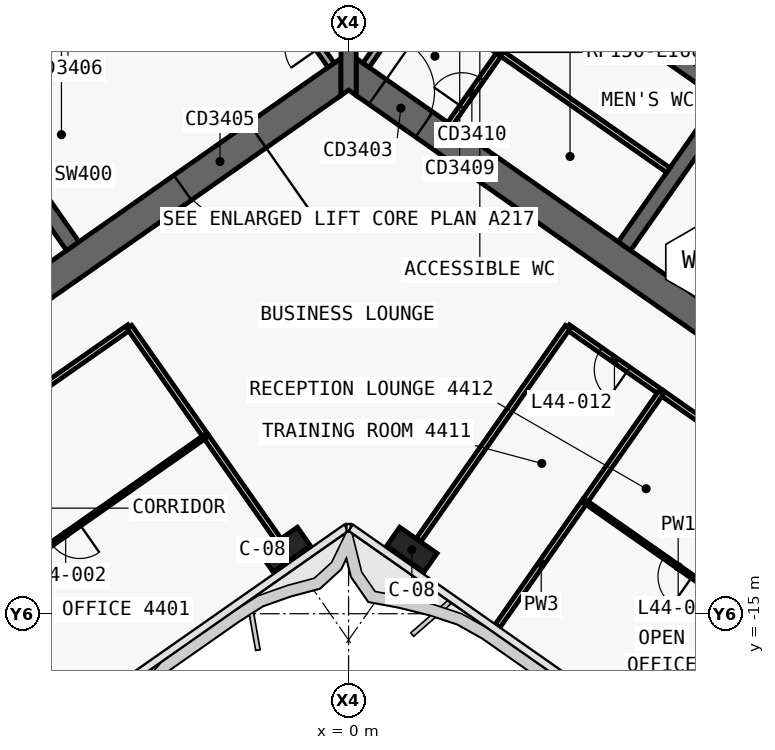
"""IFC4 building model, lengths in metres.
Left out: names, types, materials, properties, quantities, classifications, styles, units other than length and angle.
Written with IfcOpenShell. Run it as: python <this file> out.ifc"""

import sys

from ifc_helpers import new_model, si_unit, direction, frame, frame_2d, origin, origin_2d, place, context, subcontext, project, spatial, polyline, rectangle, outline, extrude, element, fill, save


model = new_model("IFC4")
c1 = context("Model", 3, precision=1e-05, world=origin(), true_north=direction((0.0, 1.0)))
c2 = subcontext(c1, "Body", "Model", "MODEL_VIEW")
j1 = project(units=[si_unit("LENGTHUNIT", "METRE"), si_unit("PLANEANGLEUNIT", "RADIAN")], contexts=[c1])
p1 = place(None, origin())
s1 = spatial("IfcSite", under=j1, at=p1, CompositionType="ELEMENT")
p2 = place(p1, origin())
s2 = spatial("IfcBuilding", under=s1, at=p2, CompositionType="ELEMENT")
p3 = place(p2, frame((0.0, 0.0, 190.5)))
s3 = spatial("IfcBuildingStorey", under=s2, at=p3, CompositionType="ELEMENT", Elevation=190.5)
p4 = place(p3, frame((0.029, 11.984, 0.0), z_axis=(0.0, 0.0, 1.0), x_axis=(-0.819151382952, -0.573577380837, 0.0)))
e1 = element("IfcWall", 1, at=p4, inside=s3, PredefinedType="SHEAR", context=c2, shape_type="SweptSolid", body=[
    extrude(outline(polyline([(33.898, 0.4), (0.56, 0.4), (-0.0, -0.4), (33.898, -0.4), (33.898, 0.4)])), origin(), (0.0, 0.0, 1.0), 3.9),
])
p5 = place(p3, frame((0.029, -0.712, 0.0), z_axis=(0.0, 0.0, 1.0), x_axis=(-0.819151758019, -0.573576845187, 0.0)))
e2 = element("IfcWall", 2, at=p5, inside=s3, PredefinedType="SHEAR", context=c2, shape_type="SweptSolid", body=[
    extrude(outline(polyline([(26.616, 0.4), (0.56, 0.4), (-0.0, -0.4), (26.616, -0.4), (26.616, 0.4)])), origin(), (0.0, 0.0, 1.0), 3.9),
])
p6 = place(p5, frame((2.966, 0.0, 0.0)))
e3 = element("IfcOpeningElement", 3, at=p6, cuts=e2, PredefinedType="OPENING", context=c2, shape_type="SweptSolid", body=[
    extrude(rectangle(XDim=2.4, YDim=2.1, at=frame_2d((1.2, 1.05))), frame((0.0, 0.41, 0.0), z_axis=(0.0, -1.0, 0.0), x_axis=(1.0, 0.0, 0.0)), (0.0, 0.0, 1.0), 0.82),
])
p7 = place(p5, frame((11.916, 0.0, 0.0)))
e4 = element("IfcOpeningElement", 4, at=p7, cuts=e2, PredefinedType="OPENING", context=c2, shape_type="SweptSolid", body=[
    extrude(rectangle(XDim=2.4, YDim=2.1, at=frame_2d((1.2, 1.05))), frame((0.0, 0.41, 0.0), z_axis=(0.0, -1.0, 0.0), x_axis=(1.0, 0.0, 0.0)), (0.0, 0.0, 1.0), 0.82),
])
p8 = place(p3, frame((-7.258, -5.326, 0.0), z_axis=(0.0, 0.0, 1.0), x_axis=(-0.573540709186, 0.819177059558, 0.0)))
e5 = element("IfcWall", 5, at=p8, inside=s3, PredefinedType="SHEAR", context=c2, shape_type="SweptSolid", body=[
    extrude(outline(polyline([(4.6, 0.2), (-0.0, 0.2), (-0.0, -0.2), (4.6, -0.2), (4.6, 0.2)])), origin(), (0.0, 0.0, 1.0), 3.9),
])
p9 = place(p3, frame((-2.638, 3.768, 0.0), z_axis=(0.0, 0.0, 1.0), x_axis=(-0.81915267502, -0.573575535572, 0.0)))
e6 = element("IfcWall", 6, at=p9, inside=s3, PredefinedType="SHEAR", context=c2, shape_type="SweptSolid", body=[
    extrude(outline(polyline([(26.2, 0.2), (0.0, 0.2), (0.0, -0.2), (26.2, -0.2), (26.2, 0.2)])), origin(), (0.0, 0.0, 1.0), 3.9),
])
p10 = place(p9, frame((1.169, 0.0, 0.0)))
e7 = element("IfcOpeningElement", 7, at=p10, cuts=e6, PredefinedType="OPENING", context=c2, shape_type="SweptSolid", body=[
    extrude(rectangle(XDim=1.1, YDim=2.1, at=frame_2d((0.55, 1.05))), frame((0.0, 0.21, 0.0), z_axis=(0.0, -1.0, 0.0), x_axis=(1.0, 0.0, 0.0)), (0.0, 0.0, 1.0), 0.42),
])
p11 = place(p9, frame((3.206, 0.0, 0.0)))
e8 = element("IfcOpeningElement", 8, at=p11, cuts=e6, PredefinedType="OPENING", context=c2, shape_type="SweptSolid", body=[
    extrude(rectangle(XDim=1.1, YDim=2.1, at=frame_2d((0.55, 1.05))), frame((0.0, 0.21, 0.0), z_axis=(0.0, -1.0, 0.0), x_axis=(1.0, 0.0, 0.0)), (0.0, 0.0, 1.0), 0.42),
])
p12 = place(p9, frame((5.244, 0.0, 0.0)))
e9 = element("IfcOpeningElement", 9, at=p12, cuts=e6, PredefinedType="OPENING", context=c2, shape_type="SweptSolid", body=[
    extrude(rectangle(XDim=1.1, YDim=2.1, at=frame_2d((0.55, 1.05))), frame((0.0, 0.21, 0.0), z_axis=(0.0, -1.0, 0.0), x_axis=(1.0, 0.0, 0.0)), (0.0, 0.0, 1.0), 0.42),
])
p13 = place(p9, frame((7.281, 0.0, 0.0)))
e10 = element("IfcOpeningElement", 10, at=p13, cuts=e6, PredefinedType="OPENING", context=c2, shape_type="SweptSolid", body=[
    extrude(rectangle(XDim=1.1, YDim=2.1, at=frame_2d((0.55, 1.05))), frame((0.0, 0.21, 0.0), z_axis=(0.0, -1.0, 0.0), x_axis=(1.0, 0.0, 0.0)), (0.0, 0.0, 1.0), 0.42),
])
p14 = place(p9, frame((9.688, 0.0, 0.0)))
e11 = element("IfcOpeningElement", 11, at=p14, cuts=e6, PredefinedType="OPENING", context=c2, shape_type="SweptSolid", body=[
    extrude(rectangle(XDim=1.1, YDim=2.1, at=frame_2d((0.55, 1.05))), frame((0.0, 0.21, 0.0), z_axis=(0.0, -1.0, 0.0), x_axis=(1.0, 0.0, 0.0)), (0.0, 0.0, 1.0), 0.42),
])
p15 = place(p9, frame((11.863, 0.0, 0.0)))
e12 = element("IfcOpeningElement", 12, at=p15, cuts=e6, PredefinedType="OPENING", context=c2, shape_type="SweptSolid", body=[
    extrude(rectangle(XDim=1.1, YDim=2.1, at=frame_2d((0.55, 1.05))), frame((0.0, 0.21, 0.0), z_axis=(0.0, -1.0, 0.0), x_axis=(1.0, 0.0, 0.0)), (0.0, 0.0, 1.0), 0.42),
])
p16 = place(p9, frame((15.175, 0.0, 0.0)))
e13 = element("IfcOpeningElement", 13, at=p16, cuts=e6, PredefinedType="OPENING", context=c2, shape_type="SweptSolid", body=[
    extrude(rectangle(XDim=1.0, YDim=2.1, at=frame_2d((0.5, 1.05))), frame((0.0, 0.21, 0.0), z_axis=(0.0, -1.0, 0.0), x_axis=(1.0, 0.0, 0.0)), (0.0, 0.0, 1.0), 0.42),
])
p17 = place(p3, frame((-0.029, 11.984, 0.0), z_axis=(0.0, 0.0, 1.0), x_axis=(0.819151382952, -0.573577380837, 0.0)))
e14 = element("IfcWall", 14, at=p17, inside=s3, PredefinedType="SHEAR", context=c2, shape_type="SweptSolid", body=[
    extrude(outline(polyline([(33.898, 0.4), (-0.0, 0.4), (0.56, -0.4), (33.898, -0.4), (33.898, 0.4)])), origin(), (0.0, 0.0, 1.0), 3.9),
])
p18 = place(p3, frame((-0.029, -0.712, 0.0), z_axis=(0.0, 0.0, 1.0), x_axis=(0.819151758019, -0.573576845187, 0.0)))
e15 = element("IfcWall", 15, at=p18, inside=s3, PredefinedType="SHEAR", context=c2, shape_type="SweptSolid", body=[
    extrude(outline(polyline([(26.616, 0.4), (-0.0, 0.4), (0.56, -0.4), (26.616, -0.4), (26.616, 0.4)])), origin(), (0.0, 0.0, 1.0), 3.9),
])
p19 = place(p18, frame((0.966, 0.0, 0.0)))
e16 = element("IfcOpeningElement", 16, at=p19, cuts=e15, PredefinedType="OPENING", context=c2, shape_type="SweptSolid", body=[
    extrude(rectangle(XDim=1.5, YDim=2.1, at=frame_2d((0.75, 1.05))), frame((0.0, 0.41, 0.0), z_axis=(0.0, -1.0, 0.0), x_axis=(1.0, 0.0, 0.0)), (0.0, 0.0, 1.0), 0.82),
])
p20 = place(p18, frame((12.366, 0.0, 0.0)))
e17 = element("IfcOpeningElement", 17, at=p20, cuts=e15, PredefinedType="OPENING", context=c2, shape_type="SweptSolid", body=[
    extrude(rectangle(XDim=1.5, YDim=2.1, at=frame_2d((0.75, 1.05))), frame((0.0, 0.41, 0.0), z_axis=(0.0, -1.0, 0.0), x_axis=(1.0, 0.0, 0.0)), (0.0, 0.0, 1.0), 0.82),
])
p21 = place(p3, frame((7.258, -5.326, 0.0), z_axis=(0.0, 0.0, 1.0), x_axis=(0.573540709186, 0.819177059558, 0.0)))
e18 = element("IfcWall", 18, at=p21, inside=s3, PredefinedType="SHEAR", context=c2, shape_type="SweptSolid", body=[
    extrude(outline(polyline([(-0.0, 0.2), (-0.0, -0.2), (4.6, -0.2), (4.6, 0.2), (-0.0, 0.2)])), origin(), (0.0, 0.0, 1.0), 3.9),
])
p22 = place(p3, frame((2.638, 3.768, 0.0), z_axis=(0.0, 0.0, 1.0), x_axis=(0.81915267502, -0.573575535572, 0.0)))
e19 = element("IfcWall", 19, at=p22, inside=s3, PredefinedType="SHEAR", context=c2, shape_type="SweptSolid", body=[
    extrude(outline(polyline([(0.0, 0.2), (0.0, -0.2), (26.2, -0.2), (26.2, 0.2), (0.0, 0.2)])), origin(), (0.0, 0.0, 1.0), 3.9),
])
p23 = place(p22, frame((9.637, 0.0, 0.0)))
e20 = element("IfcOpeningElement", 20, at=p23, cuts=e19, PredefinedType="OPENING", context=c2, shape_type="SweptSolid", body=[
    extrude(rectangle(XDim=1.2, YDim=2.1, at=frame_2d((0.6, 1.05))), frame((0.0, 0.21, 0.0), z_axis=(0.0, -1.0, 0.0), x_axis=(1.0, 0.0, 0.0)), (0.0, 0.0, 1.0), 0.42),
])
p24 = place(p22, frame((11.812, 0.0, 0.0)))
e21 = element("IfcOpeningElement", 21, at=p24, cuts=e19, PredefinedType="OPENING", context=c2, shape_type="SweptSolid", body=[
    extrude(rectangle(XDim=1.2, YDim=2.1, at=frame_2d((0.6, 1.05))), frame((0.0, 0.21, 0.0), z_axis=(0.0, -1.0, 0.0), x_axis=(1.0, 0.0, 0.0)), (0.0, 0.0, 1.0), 0.42),
])
p25 = place(p22, frame((13.988, 0.0, 0.0)))
e22 = element("IfcOpeningElement", 22, at=p25, cuts=e19, PredefinedType="OPENING", context=c2, shape_type="SweptSolid", body=[
    extrude(rectangle(XDim=1.2, YDim=2.1, at=frame_2d((0.6, 1.05))), frame((0.0, 0.21, 0.0), z_axis=(0.0, -1.0, 0.0), x_axis=(1.0, 0.0, 0.0)), (0.0, 0.0, 1.0), 0.42),
])
p26 = place(p22, frame((16.262, 0.0, 0.0)))
e23 = element("IfcOpeningElement", 23, at=p26, cuts=e19, PredefinedType="OPENING", context=c2, shape_type="SweptSolid", body=[
    extrude(rectangle(XDim=1.0, YDim=2.1, at=frame_2d((0.5, 1.05))), frame((0.0, 0.21, 0.0), z_axis=(0.0, -1.0, 0.0), x_axis=(1.0, 0.0, 0.0)), (0.0, 0.0, 1.0), 0.42),
])
p27 = place(p3, frame((0.0, -1.361, 0.0), z_axis=(0.0, 0.0, 1.0), x_axis=(0.0, 1.0, 0.0)))
e24 = element("IfcWall", 24, at=p27, inside=s3, PredefinedType="SHEAR", context=c2, shape_type="SweptSolid", body=[
    extrude(outline(polyline([(0.0, -0.2), (0.14, -0.2), (1.075, -0.2), (12.696, -0.2), (13.813, -0.2), (13.893, -0.2), (13.933, -0.172), (13.813, 0.0), (13.933, 0.172), (13.893, 0.2), (13.813, 0.2), (12.696, 0.2), (1.075, 0.2), (0.14, 0.2), (0.0, 0.2), (0.14, 0.0), (0.0, -0.2)])), origin(), (0.0, 0.0, 1.0), 3.9),
])
for number, where, z_axis, x_axis in (
    (25, (-1.665, -13.313, 0.0), (0.0, 0.0, 1.0), (-0.819, -0.574, 0.0)),
    (26, (1.665, -13.313, 0.0), (0.0, 0.0, 1.0), (0.819, -0.574, 0.0)),
):
    element("IfcColumn", number, at=place(p3, frame(where, z_axis=z_axis, x_axis=x_axis)), inside=s3, PredefinedType="COLUMN", context=c2, shape_type="SweptSolid", body=[
        extrude(rectangle(XDim=1.2, YDim=0.6, at=origin_2d()), origin(), (0.0, 0.0, 1.0), 3.9),
    ])
p28 = place(p3, frame((2.67, -2.114, 0.0), z_axis=(0.0, 0.0, 1.0), x_axis=(0.573576324356, 0.819152122709, 0.0)))
e27 = element("IfcWall", 27, at=p28, inside=s3, PredefinedType="PARTITIONING", context=c2, shape_type="SweptSolid", body=[
    extrude(rectangle(XDim=4.6, YDim=0.15, at=frame_2d((2.3, 0.0))), origin(), (0.0, 0.0, 1.0), 3.62),
])
p29 = place(p28, frame((0.55, 0.0, 0.0)))
e28 = element("IfcOpeningElement", 28, at=p29, cuts=e27, PredefinedType="OPENING", context=c2, shape_type="SweptSolid", body=[
    extrude(rectangle(XDim=0.9, YDim=2.1, at=frame_2d((0.45, 1.05))), frame((0.0, 0.085, 0.0), z_axis=(0.0, -1.0, 0.0), x_axis=(1.0, 0.0, 0.0)), (0.0, 0.0, 1.0), 0.17),
])
p30 = place(p28, frame((2.95, 0.0, 0.0)))
e29 = element("IfcOpeningElement", 29, at=p30, cuts=e27, PredefinedType="OPENING", context=c2, shape_type="SweptSolid", body=[
    extrude(rectangle(XDim=0.9, YDim=2.1, at=frame_2d((0.45, 1.05))), frame((0.0, 0.085, 0.0), z_axis=(0.0, -1.0, 0.0), x_axis=(1.0, 0.0, 0.0)), (0.0, 0.0, 1.0), 0.17),
])
p31 = place(p3, frame((1.86, 1.261, 0.0), z_axis=(0.0, 0.0, 1.0), x_axis=(0.819103967032, -0.573645091666, 0.0)))
e30 = element("IfcWall", 30, at=p31, inside=s3, PredefinedType="PARTITIONING", context=c2, shape_type="SweptSolid", body=[
    extrude(rectangle(XDim=2.6, YDim=0.15, at=frame_2d((1.3, 0.0))), origin(), (0.0, 0.0, 1.0), 3.62),
])
p32 = place(p31, frame((0.85, 0.0, 0.0)))
e31 = element("IfcOpeningElement", 31, at=p32, cuts=e30, PredefinedType="OPENING", context=c2, shape_type="SweptSolid", body=[
    extrude(rectangle(XDim=0.9, YDim=2.1, at=frame_2d((0.45, 1.05))), frame((0.0, 0.085, 0.0), z_axis=(0.0, -1.0, 0.0), x_axis=(1.0, 0.0, 0.0)), (0.0, 0.0, 1.0), 0.17),
])
p33 = place(p3, frame((3.99, -0.23, 0.0), z_axis=(0.0, 0.0, 1.0), x_axis=(0.819153326956, -0.573574604508, 0.0)))
e32 = element("IfcWall", 32, at=p33, inside=s3, PredefinedType="PARTITIONING", context=c2, shape_type="SweptSolid", body=[
    extrude(rectangle(XDim=5.4, YDim=0.15, at=frame_2d((2.7, 0.0))), origin(), (0.0, 0.0, 1.0), 3.62),
])
p34 = place(p3, frame((-0.459, -0.565, 0.0), z_axis=(0.0, 0.0, 1.0), x_axis=(-0.573576324356, 0.819152122709, 0.0)))
e33 = element("IfcWall", 33, at=p34, inside=s3, PredefinedType="SOLIDWALL", context=c2, shape_type="SweptSolid", body=[
    extrude(rectangle(XDim=4.6, YDim=0.2, at=frame_2d((2.3, 0.0))), origin(), (0.0, 0.0, 1.0), 3.62),
])
p35 = place(p34, frame((0.55, 0.0, 0.0)))
e34 = element("IfcOpeningElement", 34, at=p35, cuts=e33, PredefinedType="OPENING", context=c2, shape_type="SweptSolid", body=[
    extrude(rectangle(XDim=0.9, YDim=2.1, at=frame_2d((0.45, 1.05))), frame((0.0, 0.11, 0.0), z_axis=(0.0, -1.0, 0.0), x_axis=(1.0, 0.0, 0.0)), (0.0, 0.0, 1.0), 0.22),
])
p36 = place(p3, frame((0.459, -0.565, 0.0), z_axis=(0.0, 0.0, 1.0), x_axis=(0.573576324356, 0.819152122709, 0.0)))
e35 = element("IfcWall", 35, at=p36, inside=s3, PredefinedType="SOLIDWALL", context=c2, shape_type="SweptSolid", body=[
    extrude(rectangle(XDim=4.6, YDim=0.2, at=frame_2d((2.3, 0.0))), origin(), (0.0, 0.0, 1.0), 3.62),
])
p37 = place(p36, frame((0.55, 0.0, 0.0)))
e36 = element("IfcOpeningElement", 36, at=p37, cuts=e35, PredefinedType="OPENING", context=c2, shape_type="SweptSolid", body=[
    extrude(rectangle(XDim=0.9, YDim=2.1, at=frame_2d((0.45, 1.05))), frame((0.0, 0.11, 0.0), z_axis=(0.0, -1.0, 0.0), x_axis=(1.0, 0.0, 0.0)), (0.0, 0.0, 1.0), 0.22),
])
p38 = place(p3, frame((8.225, -9.178, 0.0), z_axis=(0.0, 0.0, 1.0), x_axis=(-0.819132568355, 0.573604249862, 0.0)))
e37 = element("IfcWall", 37, at=p38, inside=s3, PredefinedType="PARTITIONING", context=c2, shape_type="SweptSolid", body=[
    extrude(rectangle(XDim=3.002, YDim=0.15, at=frame_2d((1.501, 0.0))), origin(), (0.0, 0.0, 1.0), 3.0),
])
p39 = place(p38, frame((1.051, 0.0, 0.0)))
e38 = element("IfcOpeningElement", 38, at=p39, cuts=e37, PredefinedType="OPENING", context=c2, shape_type="SweptSolid", body=[
    extrude(rectangle(XDim=0.9, YDim=2.1, at=frame_2d((0.45, 1.05))), frame((0.0, 0.085, 0.0), z_axis=(0.0, -1.0, 0.0), x_axis=(1.0, 0.0, 0.0)), (0.0, 0.0, 1.0), 0.17),
])
p40 = place(p3, frame((13.14, -12.619, 0.0), z_axis=(0.0, 0.0, 1.0), x_axis=(-0.819145946981, 0.573585144111, 0.0)))
e39 = element("IfcWall", 39, at=p40, inside=s3, PredefinedType="PARTITIONING", context=c2, shape_type="SweptSolid", body=[
    extrude(rectangle(XDim=6.004, YDim=0.15, at=frame_2d((3.002, 0.0))), origin(), (0.0, 0.0, 1.0), 3.0),
])
p41 = place(p40, frame((2.202, 0.0, 0.0)))
e40 = element("IfcOpeningElement", 40, at=p41, cuts=e39, PredefinedType="OPENING", context=c2, shape_type="SweptSolid", body=[
    extrude(rectangle(XDim=1.6, YDim=2.1, at=frame_2d((0.8, 1.05))), frame((0.0, 0.085, 0.0), z_axis=(0.0, -1.0, 0.0), x_axis=(1.0, 0.0, 0.0)), (0.0, 0.0, 1.0), 0.17),
])
p42 = place(p3, frame((-5.766, -7.456, 0.0), z_axis=(0.0, 0.0, 1.0), x_axis=(-0.81915291695, -0.57357519006, 0.0)))
e41 = element("IfcWall", 41, at=p42, inside=s3, PredefinedType="PARTITIONING", context=c2, shape_type="SweptSolid", body=[
    extrude(rectangle(XDim=9.002, YDim=0.15, at=frame_2d((4.501, 0.0))), origin(), (0.0, 0.0, 1.0), 3.0),
])
p43 = place(p42, frame((3.701, 0.0, 0.0)))
e42 = element("IfcOpeningElement", 42, at=p43, cuts=e41, PredefinedType="OPENING", context=c2, shape_type="SweptSolid", body=[
    extrude(rectangle(XDim=1.6, YDim=2.1, at=frame_2d((0.8, 1.05))), frame((0.0, 0.085, 0.0), z_axis=(0.0, -1.0, 0.0), x_axis=(1.0, 0.0, 0.0)), (0.0, 0.0, 1.0), 0.17),
])
p44 = place(p3, frame((6.217, -12.043, 0.0), z_axis=(0.0, 0.0, 1.0), x_axis=(-0.573523771938, -0.819188917785, 0.0)))
e43 = element("IfcWall", 43, at=p44, inside=s3, PredefinedType="PARTITIONING", context=c2, shape_type="SweptSolid", body=[
    extrude(rectangle(XDim=4.001, YDim=0.15, at=frame_2d((2.0, 0.0))), origin(), (0.0, 0.0, 1.0), 2.9),
])
p45 = place(p3, frame((8.224, -9.177, 0.0), z_axis=(0.0, 0.0, 1.0), x_axis=(-0.573602698703, -0.819133654565, 0.0)))
e44 = element("IfcWall", 44, at=p45, inside=s3, PredefinedType="PARTITIONING", context=c2, shape_type="SweptSolid", body=[
    extrude(rectangle(XDim=3.502, YDim=0.15, at=frame_2d((1.751, 0.0))), origin(), (0.0, 0.0, 1.0), 3.62),
])
p46 = place(p3, frame((1.849, -13.051, 0.0), z_axis=(0.0, 0.0, 1.0), x_axis=(0.573577493031, 0.819151304393, 0.0)))
e45 = element("IfcWall", 45, at=p46, inside=s3, PredefinedType="PARTITIONING", context=c2, shape_type="SweptSolid", body=[
    extrude(rectangle(XDim=6.83, YDim=0.15, at=frame_2d((3.415, 0.0))), origin(), (0.0, 0.0, 1.0), 3.0),
])
p47 = place(p3, frame((11.131, -15.486, 0.0), z_axis=(0.0, 0.0, 1.0), x_axis=(-0.819149710902, 0.573579768758, 0.0)))
e46 = element("IfcWall", 46, at=p47, inside=s3, PredefinedType="PARTITIONING", context=c2, shape_type="SweptSolid", body=[
    extrude(rectangle(XDim=6.0, YDim=0.1, at=frame_2d((3.0, 0.0))), origin(), (0.0, 0.0, 1.0), 3.0),
])
p48 = place(p47, frame((2.55, 0.0, 0.0)))
e47 = element("IfcOpeningElement", 47, at=p48, cuts=e46, PredefinedType="OPENING", context=c2, shape_type="SweptSolid", body=[
    extrude(rectangle(XDim=0.9, YDim=2.1, at=frame_2d((0.45, 1.05))), frame((0.0, 0.06, 0.0), z_axis=(0.0, -1.0, 0.0), x_axis=(1.0, 0.0, 0.0)), (0.0, 0.0, 1.0), 0.12),
])
p49 = place(p3, frame((-1.849, -13.051, 0.0), z_axis=(0.0, 0.0, 1.0), x_axis=(-0.573600070244, 0.819135495151, 0.0)))
e48 = element("IfcWall", 48, at=p49, inside=s3, PredefinedType="PARTITIONING", context=c2, shape_type="SweptSolid", body=[
    extrude(rectangle(XDim=3.331, YDim=0.15, at=frame_2d((1.666, 0.0))), origin(), (0.0, 0.0, 1.0), 3.0),
])
p50 = place(p3, frame((-3.758, -10.324, 0.0), z_axis=(0.0, 0.0, 1.0), x_axis=(-0.573560539213, 0.819163175355, 0.0)))
e49 = element("IfcWall", 49, at=p50, inside=s3, PredefinedType="PARTITIONING", context=c2, shape_type="SweptSolid", body=[
    extrude(rectangle(XDim=3.504, YDim=0.15, at=frame_2d((1.752, 0.0))), origin(), (0.0, 0.0, 1.0), 3.0),
])
p51 = place(p3, frame((-3.758, -10.324, 0.0), z_axis=(0.0, 0.0, 1.0), x_axis=(-0.819154173185, -0.573573395961, 0.0)))
e50 = element("IfcWall", 50, at=p51, inside=s3, PredefinedType="PARTITIONING", context=c2, shape_type="SweptSolid", body=[
    extrude(rectangle(XDim=9.0, YDim=0.1, at=frame_2d((4.5, 0.0))), origin(), (0.0, 0.0, 1.0), 3.0),
])
p52 = place(p51, frame((4.05, 0.0, 0.0)))
e51 = element("IfcOpeningElement", 51, at=p52, cuts=e50, PredefinedType="OPENING", context=c2, shape_type="SweptSolid", body=[
    extrude(rectangle(XDim=0.9, YDim=2.1, at=frame_2d((0.45, 1.05))), frame((0.0, 0.06, 0.0), z_axis=(0.0, -1.0, 0.0), x_axis=(1.0, 0.0, 0.0)), (0.0, 0.0, 1.0), 0.12),
])
p53 = place(p6, origin())
e52 = element("IfcDoor", 52, at=p53, inside=s3, OperationType="DOUBLE_DOOR_SINGLE_SWING", PredefinedType="DOOR", context=c2, shape_type="SweptSolid", body=[
    extrude(rectangle(XDim=2.4, YDim=2.1, at=frame_2d((1.2, 1.05))), frame((0.0, 0.025, 0.0), z_axis=(0.0, -1.0, 0.0), x_axis=(1.0, 0.0, 0.0)), (0.0, 0.0, 1.0), 0.05),
])
fill(e3, e52)
p54 = place(p29, origin())
e53 = element("IfcDoor", 53, at=p54, inside=s3, OperationType="SINGLE_SWING_RIGHT", PredefinedType="DOOR", context=c2, shape_type="SweptSolid", body=[
    extrude(rectangle(XDim=0.9, YDim=2.1, at=frame_2d((0.45, 1.05))), frame((0.0, 0.025, 0.0), z_axis=(0.0, -1.0, 0.0), x_axis=(1.0, 0.0, 0.0)), (0.0, 0.0, 1.0), 0.05),
])
fill(e28, e53)
p55 = place(p19, origin())
e54 = element("IfcDoor", 54, at=p55, inside=s3, OperationType="SINGLE_SWING_RIGHT", PredefinedType="DOOR", context=c2, shape_type="SweptSolid", body=[
    extrude(rectangle(XDim=1.5, YDim=2.1, at=frame_2d((0.75, 1.05))), frame((0.0, 0.025, 0.0), z_axis=(0.0, -1.0, 0.0), x_axis=(1.0, 0.0, 0.0)), (0.0, 0.0, 1.0), 0.05),
])
fill(e16, e54)
p56 = place(p52, origin())
e55 = element("IfcDoor", 55, at=p56, inside=s3, OperationType="SINGLE_SWING_LEFT", PredefinedType="DOOR", context=c2, shape_type="SweptSolid", body=[
    extrude(rectangle(XDim=0.9, YDim=2.1, at=frame_2d((0.45, 1.05))), frame((0.0, 0.025, 0.0), z_axis=(0.0, -1.0, 0.0), x_axis=(1.0, 0.0, 0.0)), (0.0, 0.0, 1.0), 0.05),
])
fill(e51, e55)
p57 = place(p39, origin())
e56 = element("IfcDoor", 56, at=p57, inside=s3, OperationType="SINGLE_SWING_LEFT", PredefinedType="DOOR", context=c2, shape_type="SweptSolid", body=[
    extrude(rectangle(XDim=0.9, YDim=2.1, at=frame_2d((0.45, 1.05))), frame((0.0, 0.025, 0.0), z_axis=(0.0, -1.0, 0.0), x_axis=(1.0, 0.0, 0.0)), (0.0, 0.0, 1.0), 0.05),
])
fill(e38, e56)
p58 = place(p48, origin())
e57 = element("IfcDoor", 57, at=p58, inside=s3, OperationType="SINGLE_SWING_RIGHT", PredefinedType="DOOR", context=c2, shape_type="SweptSolid", body=[
    extrude(rectangle(XDim=0.9, YDim=2.1, at=frame_2d((0.45, 1.05))), frame((0.0, 0.025, 0.0), z_axis=(0.0, -1.0, 0.0), x_axis=(1.0, 0.0, 0.0)), (0.0, 0.0, 1.0), 0.05),
])
fill(e47, e57)
save(model, sys.argv[1])
